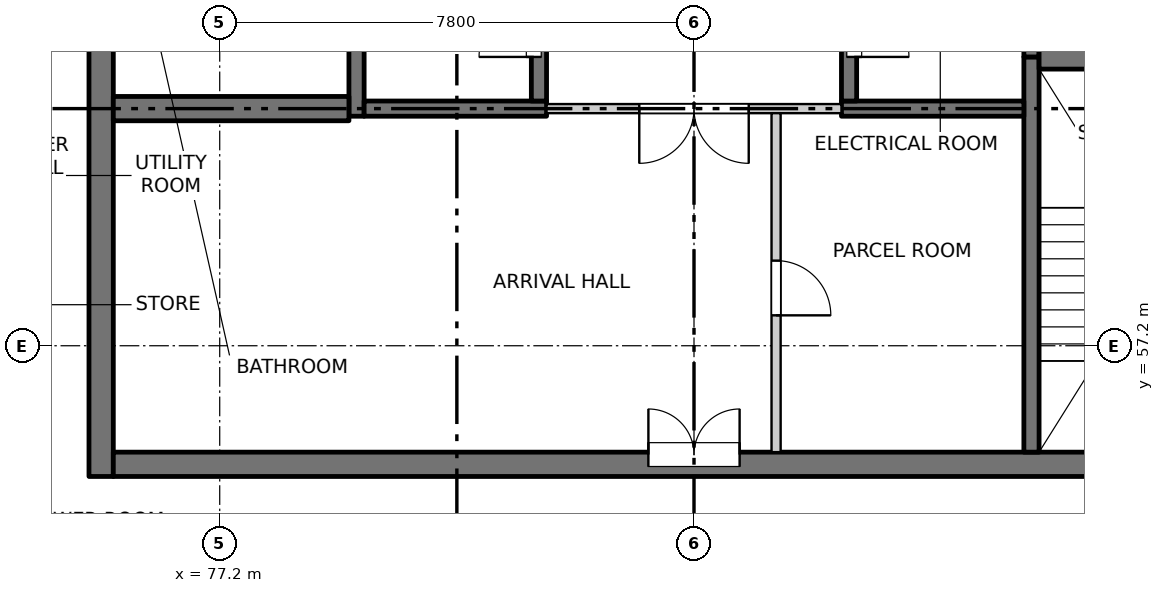
"""IFC4 building model, lengths in metres.
Left out: names, types, materials, properties, quantities, classifications, styles, units other than length and angle.
Written with IfcOpenShell. Run it as: python <this file> out.ifc"""

import sys

from ifc_helpers import new_model, si_unit, direction, frame, frame_2d, origin, place, context, subcontext, project, spatial, rectangle, extrude, element, fill, save


model = new_model("IFC4")
c1 = context("Model", 3, precision=1e-05, world=origin(), true_north=direction((0.0, 1.0)))
c2 = subcontext(c1, "Body", "Model", "MODEL_VIEW")
j1 = project(units=[si_unit("LENGTHUNIT", "METRE"), si_unit("PLANEANGLEUNIT", "RADIAN")], contexts=[c1])
p1 = place(None, origin())
s1 = spatial("IfcSite", under=j1, at=p1, CompositionType="ELEMENT")
p2 = place(p1, origin())
s2 = spatial("IfcBuilding", under=s1, at=p2, CompositionType="ELEMENT")
p3 = place(p2, frame((0.0, 0.0, 204.1)))
s3 = spatial("IfcBuildingStorey", under=s2, at=p3, CompositionType="ELEMENT", Elevation=204.1)
p4 = place(p3, frame((75.25, 55.05, -0.25), z_axis=(0.0, 0.0, 1.0), x_axis=(0.0, 1.0, 0.0)))
e1 = element("IfcWall", 1, at=p4, inside=s3, PredefinedType="SOLIDWALL", context=c2, shape_type="SweptSolid", body=[
    extrude(rectangle(XDim=22.25, YDim=0.4, at=frame_2d((11.125, 0.0))), origin(), (0.0, 0.0, 1.0), 3.4),
])
p5 = place(p4, frame((7.4, 0.0, 0.25)))
e2 = element("IfcOpeningElement", 2, at=p5, cuts=e1, PredefinedType="OPENING", context=c2, shape_type="SweptSolid", body=[
    extrude(rectangle(XDim=0.9, YDim=2.1, at=frame_2d((0.45, 1.05))), frame((0.0, 0.21, 0.0), z_axis=(0.0, -1.0, 0.0), x_axis=(1.0, 0.0, 0.0)), (0.0, 0.0, 1.0), 0.42),
])
p6 = place(p4, frame((13.7, 0.0, 0.25)))
e3 = element("IfcOpeningElement", 3, at=p6, cuts=e1, PredefinedType="OPENING", context=c2, shape_type="SweptSolid", body=[
    extrude(rectangle(XDim=0.9, YDim=2.1, at=frame_2d((0.45, 1.05))), frame((0.0, 0.21, 0.0), z_axis=(0.0, -1.0, 0.0), x_axis=(1.0, 0.0, 0.0)), (0.0, 0.0, 1.0), 0.42),
])
p7 = place(p4, frame((20.0, 0.0, 0.25)))
e4 = element("IfcOpeningElement", 4, at=p7, cuts=e1, PredefinedType="OPENING", context=c2, shape_type="SweptSolid", body=[
    extrude(rectangle(XDim=0.9, YDim=2.1, at=frame_2d((0.45, 1.05))), frame((0.0, 0.21, 0.0), z_axis=(0.0, -1.0, 0.0), x_axis=(1.0, 0.0, 0.0)), (0.0, 0.0, 1.0), 0.42),
])
p8 = place(p3, frame((75.45, 55.25, -0.25), z_axis=(0.0, 0.0, 1.0), x_axis=(1.0, 0.0, 0.0)))
e5 = element("IfcWall", 5, at=p8, inside=s3, PredefinedType="SOLIDWALL", context=c2, shape_type="SweptSolid", body=[
    extrude(rectangle(XDim=19.1, YDim=0.4, at=frame_2d((9.55, 0.0))), origin(), (0.0, 0.0, 1.0), 3.4),
])
p9 = place(p8, frame((8.8, 0.0, 0.25)))
e6 = element("IfcOpeningElement", 6, at=p9, cuts=e5, PredefinedType="OPENING", context=c2, shape_type="SweptSolid", body=[
    extrude(rectangle(XDim=1.5, YDim=2.1, at=frame_2d((0.75, 1.05))), frame((0.0, 0.21, 0.0), z_axis=(0.0, -1.0, 0.0), x_axis=(1.0, 0.0, 0.0)), (0.0, 0.0, 1.0), 0.42),
])
p10 = place(p3, frame((79.45, 60.975, -0.25), z_axis=(0.0, 0.0, 1.0), x_axis=(0.0, 1.0, 0.0)))
e7 = element("IfcWall", 7, at=p10, inside=s3, PredefinedType="SOLIDWALL", context=c2, shape_type="SweptSolid", body=[
    extrude(rectangle(XDim=16.325, YDim=0.25, at=frame_2d((8.163, 0.0))), origin(), (0.0, 0.0, 1.0), 3.4),
])
p11 = place(p3, frame((90.55, 55.45, -0.25), z_axis=(0.0, 0.0, 1.0), x_axis=(0.0, 1.0, 0.0)))
e8 = element("IfcWall", 8, at=p11, inside=s3, PredefinedType="SOLIDWALL", context=c2, shape_type="SweptSolid", body=[
    extrude(rectangle(XDim=6.5, YDim=0.25, at=frame_2d((3.25, 0.0))), origin(), (0.0, 0.0, 1.0), 3.4),
])
p12 = place(p3, frame((90.55, 61.95, -0.25), z_axis=(0.0, 0.0, 1.0), x_axis=(0.0, 1.0, 0.0)))
e9 = element("IfcWall", 9, at=p12, inside=s3, PredefinedType="SOLIDWALL", context=c2, shape_type="SweptSolid", body=[
    extrude(rectangle(XDim=15.35, YDim=0.25, at=frame_2d((7.675, 0.0))), origin(), (0.0, 0.0, 1.0), 3.4),
])
p13 = place(p3, frame((79.575, 61.1, -0.25), z_axis=(0.0, 0.0, 1.0), x_axis=(1.0, 0.0, 0.0)))
e10 = element("IfcWall", 10, at=p13, inside=s3, PredefinedType="SOLIDWALL", context=c2, shape_type="SweptSolid", body=[
    extrude(rectangle(XDim=3.0, YDim=0.25, at=frame_2d((1.5, 0.0))), origin(), (0.0, 0.0, 1.0), 3.4),
])
p14 = place(p3, frame((82.45, 61.225, -0.25), z_axis=(0.0, 0.0, 1.0), x_axis=(0.0, 1.0, 0.0)))
e11 = element("IfcWall", 11, at=p14, inside=s3, PredefinedType="SOLIDWALL", context=c2, shape_type="SweptSolid", body=[
    extrude(rectangle(XDim=2.35, YDim=0.25, at=frame_2d((1.175, 0.0))), origin(), (0.0, 0.0, 1.0), 3.4),
])
p15 = place(p14, frame((0.725, 0.0, 0.25)))
e12 = element("IfcOpeningElement", 12, at=p15, cuts=e11, PredefinedType="OPENING", context=c2, shape_type="SweptSolid", body=[
    extrude(rectangle(XDim=0.9, YDim=2.1, at=frame_2d((0.45, 1.05))), frame((0.0, 0.135, 0.0), z_axis=(0.0, -1.0, 0.0), x_axis=(1.0, 0.0, 0.0)), (0.0, 0.0, 1.0), 0.27),
])
p16 = place(p3, frame((87.425, 61.1, -0.25), z_axis=(0.0, 0.0, 1.0), x_axis=(1.0, 0.0, 0.0)))
e13 = element("IfcWall", 13, at=p16, inside=s3, PredefinedType="SOLIDWALL", context=c2, shape_type="SweptSolid", body=[
    extrude(rectangle(XDim=3.0, YDim=0.25, at=frame_2d((1.5, 0.0))), origin(), (0.0, 0.0, 1.0), 3.4),
])
p17 = place(p3, frame((87.55, 61.225, -0.25), z_axis=(0.0, 0.0, 1.0), x_axis=(0.0, 1.0, 0.0)))
e14 = element("IfcWall", 14, at=p17, inside=s3, PredefinedType="SOLIDWALL", context=c2, shape_type="SweptSolid", body=[
    extrude(rectangle(XDim=2.35, YDim=0.25, at=frame_2d((1.175, 0.0))), origin(), (0.0, 0.0, 1.0), 3.4),
])
p18 = place(p17, frame((0.725, 0.0, 0.25)))
e15 = element("IfcOpeningElement", 15, at=p18, cuts=e14, PredefinedType="OPENING", context=c2, shape_type="SweptSolid", body=[
    extrude(rectangle(XDim=0.9, YDim=2.1, at=frame_2d((0.45, 1.05))), frame((0.0, 0.135, 0.0), z_axis=(0.0, -1.0, 0.0), x_axis=(1.0, 0.0, 0.0)), (0.0, 0.0, 1.0), 0.27),
])
for number, where, z_axis, x_axis in (
    (16, (75.45, 61.1, -0.25), (0.0, 0.0, 1.0), (1.0, 0.0, 0.0)),
    (17, (90.675, 61.95, -0.25), (0.0, 0.0, 1.0), (1.0, 0.0, 0.0)),
):
    element("IfcWall", number, at=place(p3, frame(where, z_axis=z_axis, x_axis=x_axis)), inside=s3, PredefinedType="SOLIDWALL", context=c2, shape_type="SweptSolid", body=[
        extrude(rectangle(XDim=3.875, YDim=0.4, at=frame_2d((1.938, 0.0))), origin(), (0.0, 0.0, 1.0), 3.4),
    ])
p19 = place(p3, frame((82.575, 61.1, 0.0), z_axis=(0.0, 0.0, 1.0), x_axis=(1.0, 0.0, 0.0)))
e18 = element("IfcWall", 18, at=p19, inside=s3, PredefinedType="PARTITIONING", context=c2, shape_type="SweptSolid", body=[
    extrude(rectangle(XDim=4.85, YDim=0.15, at=frame_2d((2.425, 0.0))), origin(), (0.0, 0.0, 1.0), 3.15),
])
p20 = place(p19, frame((1.525, 0.0, 0.0)))
e19 = element("IfcOpeningElement", 19, at=p20, cuts=e18, PredefinedType="OPENING", context=c2, shape_type="SweptSolid", body=[
    extrude(rectangle(XDim=1.8, YDim=2.1, at=frame_2d((0.9, 1.05))), frame((0.0, 0.085, 0.0), z_axis=(0.0, -1.0, 0.0), x_axis=(1.0, 0.0, 0.0)), (0.0, 0.0, 1.0), 0.17),
])
p21 = place(p3, frame((86.35, 55.45, 0.0), z_axis=(0.0, 0.0, 1.0), x_axis=(0.0, 1.0, 0.0)))
e20 = element("IfcWall", 20, at=p21, inside=s3, PredefinedType="PARTITIONING", context=c2, shape_type="SweptSolid", body=[
    extrude(rectangle(XDim=5.575, YDim=0.15, at=frame_2d((2.788, 0.0))), origin(), (0.0, 0.0, 1.0), 3.15),
])
p22 = place(p21, frame((2.25, 0.0, 0.0)))
e21 = element("IfcOpeningElement", 21, at=p22, cuts=e20, PredefinedType="OPENING", context=c2, shape_type="SweptSolid", body=[
    extrude(rectangle(XDim=0.9, YDim=2.1, at=frame_2d((0.45, 1.05))), frame((0.0, 0.085, 0.0), z_axis=(0.0, -1.0, 0.0), x_axis=(1.0, 0.0, 0.0)), (0.0, 0.0, 1.0), 0.17),
])
p23 = place(p9, origin())
e22 = element("IfcDoor", 22, at=p23, inside=s3, OperationType="DOUBLE_DOOR_SINGLE_SWING", PredefinedType="DOOR", context=c2, shape_type="SweptSolid", body=[
    extrude(rectangle(XDim=1.5, YDim=2.1, at=frame_2d((0.75, 1.05))), frame((0.0, 0.185, 0.0), z_axis=(0.0, -1.0, 0.0), x_axis=(1.0, 0.0, 0.0)), (0.0, 0.0, 1.0), 0.05),
])
fill(e6, e22)
p24 = place(p22, origin())
e23 = element("IfcDoor", 23, at=p24, inside=s3, OperationType="SINGLE_SWING_RIGHT", PredefinedType="DOOR", context=c2, shape_type="SweptSolid", body=[
    extrude(rectangle(XDim=0.9, YDim=2.1, at=frame_2d((0.45, 1.05))), frame((0.0, 0.025, 0.0), z_axis=(0.0, -1.0, 0.0), x_axis=(1.0, 0.0, 0.0)), (0.0, 0.0, 1.0), 0.05),
])
fill(e21, e23)
p25 = place(p20, origin())
e24 = element("IfcDoor", 24, at=p25, inside=s3, OperationType="DOUBLE_DOOR_SINGLE_SWING", PredefinedType="DOOR", context=c2, shape_type="SweptSolid", body=[
    extrude(rectangle(XDim=1.8, YDim=2.1, at=frame_2d((0.9, 1.05))), frame((0.0, 0.025, 0.0), z_axis=(0.0, -1.0, 0.0), x_axis=(1.0, 0.0, 0.0)), (0.0, 0.0, 1.0), 0.05),
])
fill(e19, e24)
p26 = place(p15, origin())
e25 = element("IfcDoor", 25, at=p26, inside=s3, OperationType="SINGLE_SWING_LEFT", PredefinedType="DOOR", context=c2, shape_type="SweptSolid", body=[
    extrude(rectangle(XDim=0.9, YDim=2.1, at=frame_2d((0.45, 1.05))), frame((0.0, 0.11, 0.0), z_axis=(0.0, -1.0, 0.0), x_axis=(1.0, 0.0, 0.0)), (0.0, 0.0, 1.0), 0.05),
])
fill(e12, e25)
p27 = place(p18, origin())
e26 = element("IfcDoor", 26, at=p27, inside=s3, OperationType="SINGLE_SWING_RIGHT", PredefinedType="DOOR", context=c2, shape_type="SweptSolid", body=[
    extrude(rectangle(XDim=0.9, YDim=2.1, at=frame_2d((0.45, 1.05))), frame((0.0, -0.06, 0.0), z_axis=(0.0, -1.0, 0.0), x_axis=(1.0, 0.0, 0.0)), (0.0, 0.0, 1.0), 0.05),
])
fill(e15, e26)
save(model, sys.argv[1])
